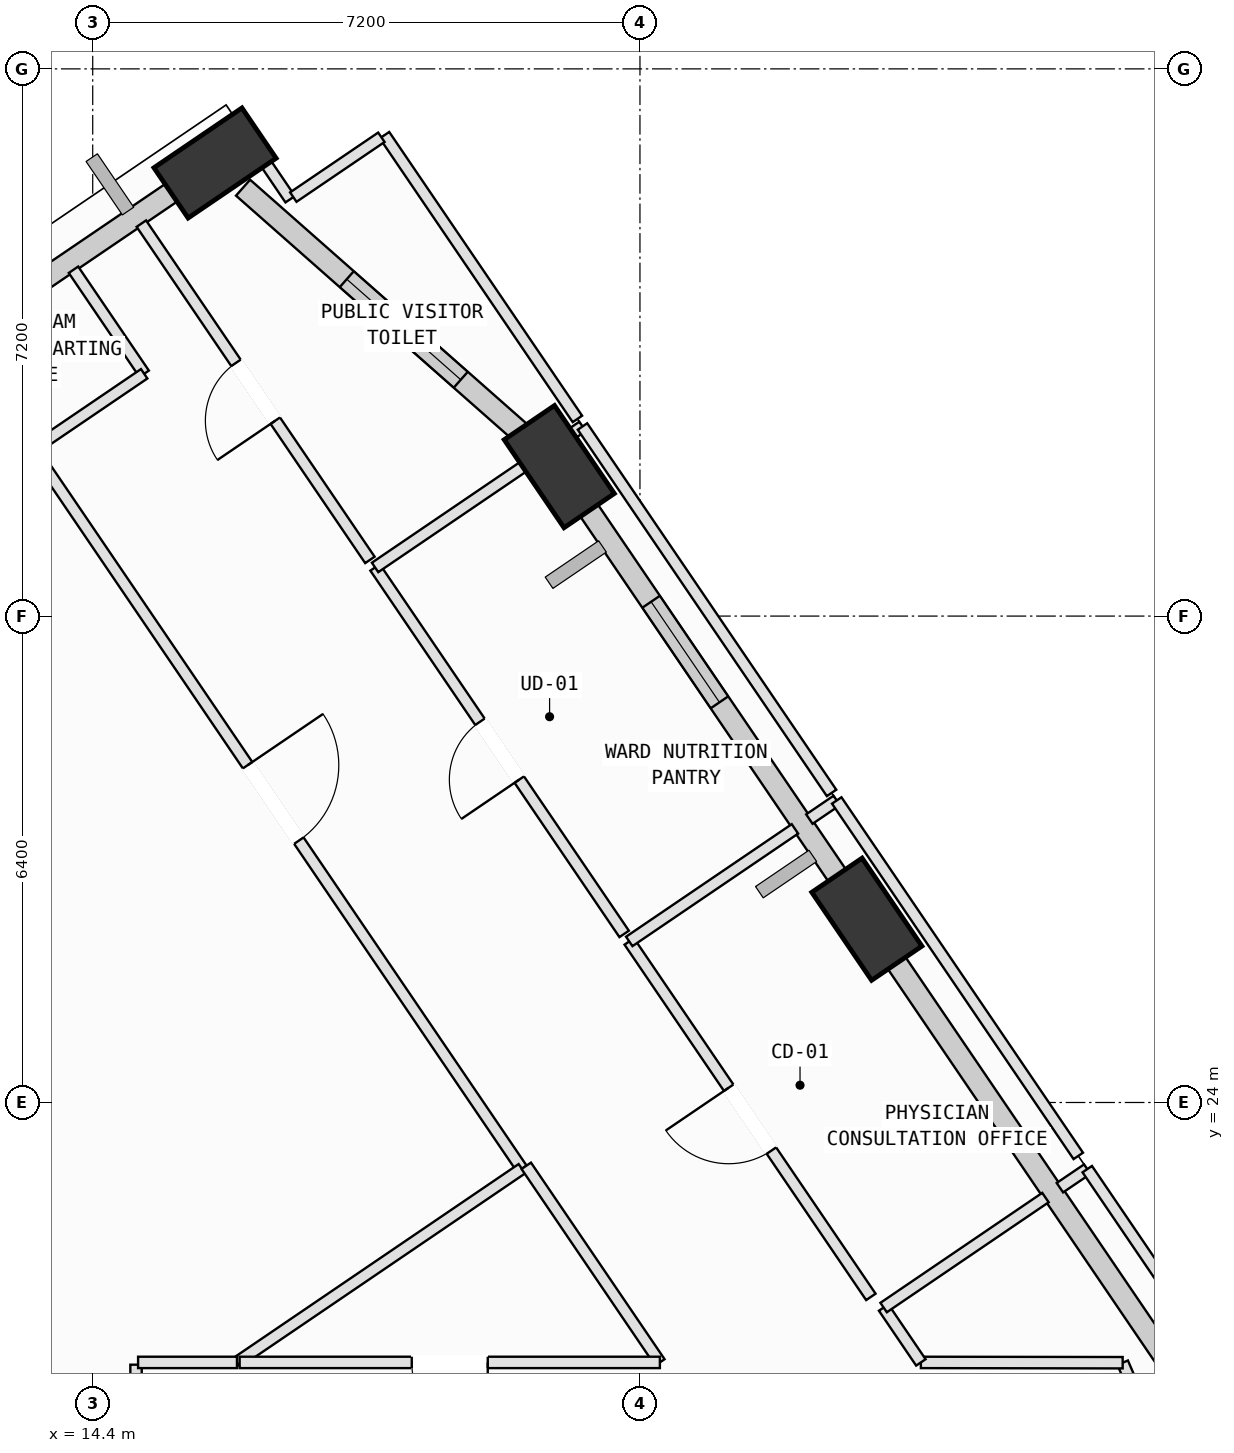
"""IFC4 building model, lengths in metres.
Left out: names, types, materials, properties, quantities, classifications, styles, units other than length and angle.
Written with IfcOpenShell. Run it as: python <this file> out.ifc"""

import sys

from ifc_helpers import new_model, si_unit, direction, frame, frame_2d, origin, origin_2d, place, context, subcontext, project, spatial, rectangle, extrude, element, fill, save


model = new_model("IFC4")
c1 = context("Model", 3, precision=1e-05, world=origin(), true_north=direction((0.0, 1.0)))
c2 = subcontext(c1, "Body", "Model", "MODEL_VIEW")
j1 = project(units=[si_unit("LENGTHUNIT", "METRE"), si_unit("PLANEANGLEUNIT", "RADIAN")], contexts=[c1])
p1 = place(None, origin())
s1 = spatial("IfcSite", under=j1, at=p1, CompositionType="ELEMENT")
p2 = place(p1, origin())
s2 = spatial("IfcBuilding", under=s1, at=p2, CompositionType="ELEMENT")
p3 = place(p2, frame((0.0, 0.0, 169.8)))
s3 = spatial("IfcBuildingStorey", under=s2, at=p3, CompositionType="ELEMENT", Elevation=169.8)
p4 = place(p3, frame((28.941, 20.002, 0.002), z_axis=(0.020030194878, -0.019114179869, 0.99961664623), x_axis=(-0.581006277016, 0.813444565277, 0.027196420538)))
e1 = element("IfcColumn", 1, at=p4, inside=s3, PredefinedType="COLUMN", context=c2, shape_type="SweptSolid", body=[
    extrude(rectangle(XDim=1.4, YDim=0.8, at=origin_2d()), origin(), (0.0, 0.0, 1.0), 3.998),
])
p5 = place(p3, frame((24.585, 26.412, 0.002), z_axis=(-0.006348894644, -0.03742185016, 0.999279388693), x_axis=(-0.415920743868, 0.908858847137, 0.031393164881)))
e2 = element("IfcColumn", 2, at=p5, inside=s3, PredefinedType="COLUMN", context=c2, shape_type="SweptSolid", body=[
    extrude(rectangle(XDim=1.4, YDim=0.8, at=origin_2d()), origin(), (0.0, 0.0, 1.0), 3.999),
])
p6 = place(p3, frame((20.538, 32.366, 0.002), z_axis=(-0.030851806234, -0.054265034679, 0.998049834459), x_axis=(-0.080649330283, 0.995404549796, 0.051628168379)))
e3 = element("IfcColumn", 3, at=p6, inside=s3, PredefinedType="COLUMN", context=c2, shape_type="SweptSolid", body=[
    extrude(rectangle(XDim=1.4, YDim=0.8, at=origin_2d()), origin(), (0.0, 0.0, 1.0), 4.004),
])
p7 = place(p3, frame((16.009, 36.362, 0.002), z_axis=(-0.047105602248, -0.07303194147, 0.996216541602), x_axis=(0.99855811031, 0.022260915864, 0.048848254409)))
e4 = element("IfcColumn", 4, at=p7, inside=s3, PredefinedType="COLUMN", context=c2, shape_type="SweptSolid", body=[
    extrude(rectangle(XDim=1.4, YDim=0.8, at=origin_2d()), origin(), (0.0, 0.0, 1.0), 4.011),
])
p8 = place(p3, frame((28.693, 20.367, 0.0), z_axis=(0.0, 0.0, 1.0), x_axis=(-0.562095643109, 0.827072238682, 0.0)))
e5 = element("IfcWall", 5, at=p8, inside=s3, PredefinedType="SOLIDWALL", context=c2, shape_type="SweptSolid", body=[
    extrude(rectangle(XDim=6.76, YDim=0.28, at=frame_2d((3.38, 0.0))), origin(), (0.0, 0.0, 1.0), 3.165),
])
p9 = place(p3, frame((24.339, 26.774, 0.0), z_axis=(0.0, 0.0, 1.0), x_axis=(-0.56206639417, 0.827092116118, 0.0)))
e6 = element("IfcWall", 6, at=p9, inside=s3, PredefinedType="SOLIDWALL", context=c2, shape_type="SweptSolid", body=[
    extrude(rectangle(XDim=6.223, YDim=0.28, at=frame_2d((3.111, 0.0))), origin(), (0.0, 0.0, 1.0), 3.145),
])
p10 = place(p9, frame((3.011, 0.0, 0.75)))
e7 = element("IfcOpeningElement", 7, at=p10, cuts=e6, PredefinedType="OPENING", context=c2, shape_type="SweptSolid", body=[
    extrude(rectangle(XDim=1.6, YDim=1.95, at=frame_2d((0.8, 0.975))), frame((0.0, 0.15, 0.0), z_axis=(0.0, -1.0, 0.0), x_axis=(1.0, 0.0, 0.0)), (0.0, 0.0, 1.0), 0.3),
])
p11 = place(p3, frame((16.378, 36.037, 0.0), z_axis=(0.0, 0.0, 1.0), x_axis=(0.74990080613, -0.661550286045, 0.0)))
e8 = element("IfcWall", 8, at=p11, inside=s3, PredefinedType="SOLIDWALL", context=c2, shape_type="SweptSolid", body=[
    extrude(rectangle(XDim=5.093, YDim=0.28, at=frame_2d((2.546, 0.0))), origin(), (0.0, 0.0, 1.0), 3.145),
])
p12 = place(p11, frame((1.82, 0.0, 0.75)))
e9 = element("IfcOpeningElement", 9, at=p12, cuts=e8, PredefinedType="OPENING", context=c2, shape_type="SweptSolid", body=[
    extrude(rectangle(XDim=2.0, YDim=1.95, at=frame_2d((1.0, 0.975))), frame((0.0, 0.15, 0.0), z_axis=(0.0, -1.0, 0.0), x_axis=(1.0, 0.0, 0.0)), (0.0, 0.0, 1.0), 0.3),
])
p13 = place(p3, frame((9.49, 31.931, 0.0), z_axis=(0.0, 0.0, 1.0), x_axis=(0.827077196418, 0.562088348184, 0.0)))
e10 = element("IfcWall", 10, at=p13, inside=s3, PredefinedType="SOLIDWALL", context=c2, shape_type="SweptSolid", body=[
    extrude(rectangle(XDim=7.23, YDim=0.28, at=frame_2d((3.615, 0.0))), origin(), (0.0, 0.0, 1.0), 3.165),
])
p14 = place(p3, frame((14.97, 20.55, 0.0), z_axis=(0.0, 0.0, 1.0), x_axis=(0.0, -1.0, 0.0)))
e11 = element("IfcWall", 11, at=p14, inside=s3, PredefinedType="PARTITIONING", context=c2, shape_type="SweptSolid", body=[
    extrude(rectangle(XDim=0.872, YDim=0.15, at=frame_2d((0.436, 0.0))), origin(), (0.0, 0.0, 1.0), 3.78),
])
p15 = place(p3, frame((13.504, 32.755, 0.0), z_axis=(0.0, 0.0, 1.0), x_axis=(0.562055261363, -0.827099681522, 0.0)))
e12 = element("IfcWall", 12, at=p15, inside=s3, PredefinedType="PARTITIONING", context=c2, shape_type="SweptSolid", body=[
    extrude(rectangle(XDim=11.639, YDim=0.15, at=frame_2d((5.82, 0.0))), origin(), (0.0, 0.0, 1.0), 3.78),
])
p16 = place(p15, frame((5.22, 0.0, 0.0)))
e13 = element("IfcOpeningElement", 13, at=p16, cuts=e12, PredefinedType="OPENING", context=c2, shape_type="SweptSolid", body=[
    extrude(rectangle(XDim=1.2, YDim=2.15, at=frame_2d((0.6, 1.075))), frame((0.0, 0.085, 0.0), z_axis=(0.0, -1.0, 0.0), x_axis=(1.0, 0.0, 0.0)), (0.0, 0.0, 1.0), 0.17),
])
p17 = place(p3, frame((20.046, 23.128, 0.0), z_axis=(0.0, 0.0, 1.0), x_axis=(-0.826993630253, -0.562211290816, 0.0)))
e14 = element("IfcWall", 14, at=p17, inside=s3, PredefinedType="PARTITIONING", context=c2, shape_type="SweptSolid", body=[
    extrude(rectangle(XDim=4.532, YDim=0.15, at=frame_2d((2.266, 0.0))), origin(), (0.0, 0.0, 1.0), 3.78),
])
p18 = place(p3, frame((16.298, 20.58, 0.0), z_axis=(0.0, 0.0, 1.0), x_axis=(-1.0, 0.0, 0.0)))
e15 = element("IfcWall", 15, at=p18, inside=s3, PredefinedType="PARTITIONING", context=c2, shape_type="SweptSolid", body=[
    extrude(rectangle(XDim=1.301, YDim=0.15, at=frame_2d((0.65, 0.0))), origin(), (0.0, 0.0, 1.0), 3.78),
])
p19 = place(p3, frame((28.175, 20.053, 0.0), z_axis=(0.0, 0.0, 1.0), x_axis=(-0.393919298579, 0.919145030018, 0.0)))
e16 = element("IfcWall", 16, at=p19, inside=s3, PredefinedType="PARTITIONING", context=c2, shape_type="SweptSolid", body=[
    extrude(rectangle(XDim=0.569, YDim=0.15, at=frame_2d((0.284, 0.0))), origin(), (0.0, 0.0, 1.0), 3.78),
])
p20 = place(p3, frame((27.951, 20.576, 0.0), z_axis=(0.0, 0.0, 1.0), x_axis=(-0.999998778176, 0.001563216481, 0.0)))
e17 = element("IfcWall", 17, at=p20, inside=s3, PredefinedType="PARTITIONING", context=c2, shape_type="SweptSolid", body=[
    extrude(rectangle(XDim=2.655, YDim=0.15, at=frame_2d((1.328, 0.0))), origin(), (0.0, 0.0, 1.0), 3.78),
])
p21 = place(p3, frame((25.296, 20.58, 0.0), z_axis=(0.0, 0.0, 1.0), x_axis=(-0.561590369645, 0.827415407593, 0.0)))
e18 = element("IfcWall", 18, at=p21, inside=s3, PredefinedType="PARTITIONING", context=c2, shape_type="SweptSolid", body=[
    extrude(rectangle(XDim=0.873, YDim=0.15, at=frame_2d((0.436, 0.0))), origin(), (0.0, 0.0, 1.0), 3.415),
])
p22 = place(p3, frame((24.806, 21.302, 0.0), z_axis=(0.0, 0.0, 1.0), x_axis=(0.827071116289, 0.562097294604, 0.0)))
e19 = element("IfcWall", 19, at=p22, inside=s3, PredefinedType="PARTITIONING", context=c2, shape_type="SweptSolid", body=[
    extrude(rectangle(XDim=2.574, YDim=0.15, at=frame_2d((1.287, 0.0))), origin(), (0.0, 0.0, 1.0), 3.78),
])
p23 = place(p3, frame((27.125, 22.879, 0.0), z_axis=(0.0, 0.0, 1.0), x_axis=(0.827708498205, 0.561158303868, 0.0)))
e20 = element("IfcWall", 20, at=p23, inside=s3, PredefinedType="PARTITIONING", context=c2, shape_type="SweptSolid", body=[
    extrude(rectangle(XDim=0.435, YDim=0.15, at=frame_2d((0.218, 0.0))), origin(), (0.0, 0.0, 1.0), 3.78),
])
p24 = place(p3, frame((27.485, 23.123, 0.0), z_axis=(0.0, 0.0, 1.0), x_axis=(0.562092073302, -0.827074664786, 0.0)))
e21 = element("IfcWall", 21, at=p24, inside=s3, PredefinedType="PARTITIONING", context=c2, shape_type="SweptSolid", body=[
    extrude(rectangle(XDim=2.85, YDim=0.15, at=frame_2d((1.425, 0.0))), origin(), (0.0, 0.0, 1.0), 3.78),
])
p25 = place(p3, frame((24.638, 21.442, 0.0), z_axis=(0.0, 0.0, 1.0), x_axis=(-0.56213996743, 0.827042113207, 0.0)))
e22 = element("IfcWall", 22, at=p25, inside=s3, PredefinedType="PARTITIONING", context=c2, shape_type="SweptSolid", body=[
    extrude(rectangle(XDim=5.655, YDim=0.15, at=frame_2d((2.828, 0.0))), origin(), (0.0, 0.0, 1.0), 3.415),
])
p26 = place(p25, frame((2.328, 0.0, 0.0)))
e23 = element("IfcOpeningElement", 23, at=p26, cuts=e22, PredefinedType="OPENING", context=c2, shape_type="SweptSolid", body=[
    extrude(rectangle(XDim=1.0, YDim=2.12, at=frame_2d((0.5, 1.06))), frame((0.0, 0.085, 0.0), z_axis=(0.0, -1.0, 0.0), x_axis=(1.0, 0.0, 0.0)), (0.0, 0.0, 1.0), 0.17),
])
p27 = place(p3, frame((21.459, 26.119, 0.0), z_axis=(0.0, 0.0, 1.0), x_axis=(0.827129756528, 0.562011001552, 0.0)))
e24 = element("IfcWall", 24, at=p27, inside=s3, PredefinedType="PARTITIONING", context=c2, shape_type="SweptSolid", body=[
    extrude(rectangle(XDim=2.635, YDim=0.15, at=frame_2d((1.318, 0.0))), origin(), (0.0, 0.0, 1.0), 3.78),
])
p28 = place(p3, frame((23.829, 27.729, 0.0), z_axis=(0.0, 0.0, 1.0), x_axis=(0.826488233945, 0.562953993813, 0.0)))
e25 = element("IfcWall", 25, at=p28, inside=s3, PredefinedType="PARTITIONING", context=c2, shape_type="SweptSolid", body=[
    extrude(rectangle(XDim=0.435, YDim=0.15, at=frame_2d((0.218, 0.0))), origin(), (0.0, 0.0, 1.0), 3.78),
])
p29 = place(p3, frame((24.189, 27.974, 0.0), z_axis=(0.0, 0.0, 1.0), x_axis=(0.562021832426, -0.827122397156, 0.0)))
e26 = element("IfcWall", 26, at=p29, inside=s3, PredefinedType="PARTITIONING", context=c2, shape_type="SweptSolid", body=[
    extrude(rectangle(XDim=5.655, YDim=0.15, at=frame_2d((2.827, 0.0))), origin(), (0.0, 0.0, 1.0), 3.78),
])
p30 = place(p3, frame((21.392, 26.218, 0.0), z_axis=(0.0, 0.0, 1.0), x_axis=(-0.562090088282, 0.827076013831, 0.0)))
e27 = element("IfcWall", 27, at=p30, inside=s3, PredefinedType="PARTITIONING", context=c2, shape_type="SweptSolid", body=[
    extrude(rectangle(XDim=5.83, YDim=0.15, at=frame_2d((2.915, 0.0))), origin(), (0.0, 0.0, 1.0), 3.78),
])
p31 = place(p30, frame((2.455, 0.0, 0.0)))
e28 = element("IfcOpeningElement", 28, at=p31, cuts=e27, PredefinedType="OPENING", context=c2, shape_type="SweptSolid", body=[
    extrude(rectangle(XDim=0.92, YDim=2.1, at=frame_2d((0.46, 1.05))), frame((0.0, 0.085, 0.0), z_axis=(0.0, -1.0, 0.0), x_axis=(1.0, 0.0, 0.0)), (0.0, 0.0, 1.0), 0.17),
])
p32 = place(p3, frame((18.115, 31.04, 0.0), z_axis=(0.0, 0.0, 1.0), x_axis=(0.827031073884, 0.562156208567, 0.0)))
e29 = element("IfcWall", 29, at=p32, inside=s3, PredefinedType="PARTITIONING", context=c2, shape_type="SweptSolid", body=[
    extrude(rectangle(XDim=3.3, YDim=0.15, at=frame_2d((1.65, 0.0))), origin(), (0.0, 0.0, 1.0), 3.78),
])
p33 = place(p3, frame((20.844, 32.895, 0.0), z_axis=(0.0, 0.0, 1.0), x_axis=(0.562090088282, -0.827076013831, 0.0)))
e30 = element("IfcWall", 30, at=p33, inside=s3, PredefinedType="PARTITIONING", context=c2, shape_type="SweptSolid", body=[
    extrude(rectangle(XDim=5.83, YDim=0.15, at=frame_2d((2.915, 0.0))), origin(), (0.0, 0.0, 1.0), 3.78),
])
p34 = place(p3, frame((18.239, 36.728, 0.0), z_axis=(0.0, 0.0, 1.0), x_axis=(0.562139923025, -0.827042143389, 0.0)))
e31 = element("IfcWall", 31, at=p34, inside=s3, PredefinedType="PARTITIONING", context=c2, shape_type="SweptSolid", body=[
    extrude(rectangle(XDim=4.515, YDim=0.15, at=frame_2d((2.258, 0.0))), origin(), (0.0, 0.0, 1.0), 3.78),
])
p35 = place(p3, frame((18.047, 31.139, 0.0), z_axis=(0.0, 0.0, 1.0), x_axis=(-0.562060362882, 0.827096214764, 0.0)))
e32 = element("IfcWall", 32, at=p35, inside=s3, PredefinedType="PARTITIONING", context=c2, shape_type="SweptSolid", body=[
    extrude(rectangle(XDim=5.35, YDim=0.15, at=frame_2d((2.675, 0.0))), origin(), (0.0, 0.0, 1.0), 3.78),
])
p36 = place(p35, frame((2.215, 0.0, 0.0)))
e33 = element("IfcOpeningElement", 33, at=p36, cuts=e32, PredefinedType="OPENING", context=c2, shape_type="SweptSolid", body=[
    extrude(rectangle(XDim=0.92, YDim=2.1, at=frame_2d((0.46, 1.05))), frame((0.0, 0.085, 0.0), z_axis=(0.0, -1.0, 0.0), x_axis=(1.0, 0.0, 0.0)), (0.0, 0.0, 1.0), 0.17),
])
p37 = place(p3, frame((15.363, 36.152, 0.0), z_axis=(0.0, 0.0, 1.0), x_axis=(0.82720957027, 0.561893519143, 0.0)))
e34 = element("IfcWall", 34, at=p37, inside=s3, PredefinedType="PARTITIONING", context=c2, shape_type="SweptSolid", body=[
    extrude(rectangle(XDim=1.203, YDim=0.15, at=frame_2d((0.601, 0.0))), origin(), (0.0, 0.0, 1.0), 3.165),
])
p38 = place(p3, frame((16.386, 36.787, 0.0), z_axis=(0.0, 0.0, 1.0), x_axis=(0.56145212795, -0.827509219296, 0.0)))
e35 = element("IfcWall", 35, at=p38, inside=s3, PredefinedType="PARTITIONING", context=c2, shape_type="SweptSolid", body=[
    extrude(rectangle(XDim=1.09, YDim=0.15, at=frame_2d((0.545, 0.0))), origin(), (0.0, 0.0, 1.0), 3.78),
])
p39 = place(p3, frame((17.039, 35.913, 0.0), z_axis=(0.0, 0.0, 1.0), x_axis=(0.827328250974, 0.561718759825, 0.0)))
e36 = element("IfcWall", 36, at=p39, inside=s3, PredefinedType="PARTITIONING", context=c2, shape_type="SweptSolid", body=[
    extrude(rectangle(XDim=1.401, YDim=0.15, at=frame_2d((0.7, 0.0))), origin(), (0.0, 0.0, 1.0), 3.78),
])
p40 = place(p3, frame((20.104, 23.167, 0.0), z_axis=(0.0, 0.0, 1.0), x_axis=(0.562081553658, -0.827081813993, 0.0)))
e37 = element("IfcWall", 37, at=p40, inside=s3, PredefinedType="PARTITIONING", context=c2, shape_type="SweptSolid", body=[
    extrude(rectangle(XDim=3.128, YDim=0.15, at=frame_2d((1.564, 0.0))), origin(), (0.0, 0.0, 1.0), 3.78),
])
p41 = place(p3, frame((21.862, 20.58, 0.0), z_axis=(0.0, 0.0, 1.0), x_axis=(-1.0, 0.0, 0.0)))
e38 = element("IfcWall", 38, at=p41, inside=s3, PredefinedType="PARTITIONING", context=c2, shape_type="SweptSolid", body=[
    extrude(rectangle(XDim=5.529, YDim=0.15, at=frame_2d((2.765, 0.0))), origin(), (0.0, 0.0, 1.0), 3.78),
])
p42 = place(p41, frame((2.264, 0.0, 0.0)))
e39 = element("IfcOpeningElement", 39, at=p42, cuts=e38, PredefinedType="OPENING", context=c2, shape_type="SweptSolid", body=[
    extrude(rectangle(XDim=1.0, YDim=2.12, at=frame_2d((0.5, 1.06))), frame((0.0, 0.085, 0.0), z_axis=(0.0, -1.0, 0.0), x_axis=(1.0, 0.0, 0.0)), (0.0, 0.0, 1.0), 0.17),
])
p43 = place(p3, frame((14.147, 34.957, 0.0), z_axis=(0.0, 0.0, 1.0), x_axis=(0.561862085879, -0.827230920875, 0.0)))
e40 = element("IfcWall", 40, at=p43, inside=s3, PredefinedType="PARTITIONING", context=c2, shape_type="SweptSolid", body=[
    extrude(rectangle(XDim=1.655, YDim=0.15, at=frame_2d((0.828, 0.0))), origin(), (0.0, 0.0, 1.0), 3.78),
])
p44 = place(p3, frame((15.077, 33.588, 0.0), z_axis=(0.0, 0.0, 1.0), x_axis=(-0.827029689207, -0.562158245665, 0.0)))
e41 = element("IfcWall", 41, at=p44, inside=s3, PredefinedType="PARTITIONING", context=c2, shape_type="SweptSolid", body=[
    extrude(rectangle(XDim=1.672, YDim=0.15, at=frame_2d((0.836, 0.0))), origin(), (0.0, 0.0, 1.0), 3.78),
])
p45 = place(p10, origin())
e42 = element("IfcWindow", 42, at=p45, inside=s3, PartitioningType="SINGLE_PANEL", PredefinedType="WINDOW", context=c2, shape_type="SweptSolid", body=[
    extrude(rectangle(XDim=1.6, YDim=1.95, at=frame_2d((0.8, 0.975))), frame((0.0, 0.03, 0.0), z_axis=(0.0, -1.0, 0.0), x_axis=(1.0, 0.0, 0.0)), (0.0, 0.0, 1.0), 0.06),
])
fill(e7, e42)
p46 = place(p12, origin())
e43 = element("IfcWindow", 43, at=p46, inside=s3, PartitioningType="SINGLE_PANEL", PredefinedType="WINDOW", context=c2, shape_type="SweptSolid", body=[
    extrude(rectangle(XDim=2.0, YDim=1.95, at=frame_2d((1.0, 0.975))), frame((0.0, 0.03, 0.0), z_axis=(0.0, -1.0, 0.0), x_axis=(1.0, 0.0, 0.0)), (0.0, 0.0, 1.0), 0.06),
])
fill(e9, e43)
p47 = place(p16, origin())
e44 = element("IfcDoor", 44, at=p47, inside=s3, OperationType="SINGLE_SWING_LEFT", PredefinedType="DOOR", context=c2, shape_type="SweptSolid", body=[
    extrude(rectangle(XDim=1.2, YDim=2.15, at=frame_2d((0.6, 1.075))), frame((0.0, 0.025, 0.0), z_axis=(0.0, -1.0, 0.0), x_axis=(1.0, 0.0, 0.0)), (0.0, 0.0, 1.0), 0.05),
])
fill(e13, e44)
p48 = place(p26, origin())
e45 = element("IfcDoor", 45, at=p48, inside=s3, OperationType="SINGLE_SWING_RIGHT", PredefinedType="DOOR", context=c2, shape_type="SweptSolid", body=[
    extrude(rectangle(XDim=1.0, YDim=2.12, at=frame_2d((0.5, 1.06))), frame((0.0, 0.025, 0.0), z_axis=(0.0, -1.0, 0.0), x_axis=(1.0, 0.0, 0.0)), (0.0, 0.0, 1.0), 0.05),
])
fill(e23, e45)
p49 = place(p31, origin())
e46 = element("IfcDoor", 46, at=p49, inside=s3, OperationType="SINGLE_SWING_LEFT", PredefinedType="DOOR", context=c2, shape_type="SweptSolid", body=[
    extrude(rectangle(XDim=0.92, YDim=2.1, at=frame_2d((0.46, 1.05))), frame((0.0, 0.025, 0.0), z_axis=(0.0, -1.0, 0.0), x_axis=(1.0, 0.0, 0.0)), (0.0, 0.0, 1.0), 0.05),
])
fill(e28, e46)
p50 = place(p36, origin())
e47 = element("IfcDoor", 47, at=p50, inside=s3, OperationType="SINGLE_SWING_LEFT", PredefinedType="DOOR", context=c2, shape_type="SweptSolid", body=[
    extrude(rectangle(XDim=0.92, YDim=2.1, at=frame_2d((0.46, 1.05))), frame((0.0, 0.025, 0.0), z_axis=(0.0, -1.0, 0.0), x_axis=(1.0, 0.0, 0.0)), (0.0, 0.0, 1.0), 0.05),
])
fill(e33, e47)
p51 = place(p42, origin())
e48 = element("IfcDoor", 48, at=p51, inside=s3, OperationType="SINGLE_SWING_LEFT", PredefinedType="DOOR", context=c2, shape_type="SweptSolid", body=[
    extrude(rectangle(XDim=1.0, YDim=2.12, at=frame_2d((0.5, 1.06))), frame((0.0, 0.025, 0.0), z_axis=(0.0, -1.0, 0.0), x_axis=(1.0, 0.0, 0.0)), (0.0, 0.0, 1.0), 0.05),
])
fill(e39, e48)
save(model, sys.argv[1])
